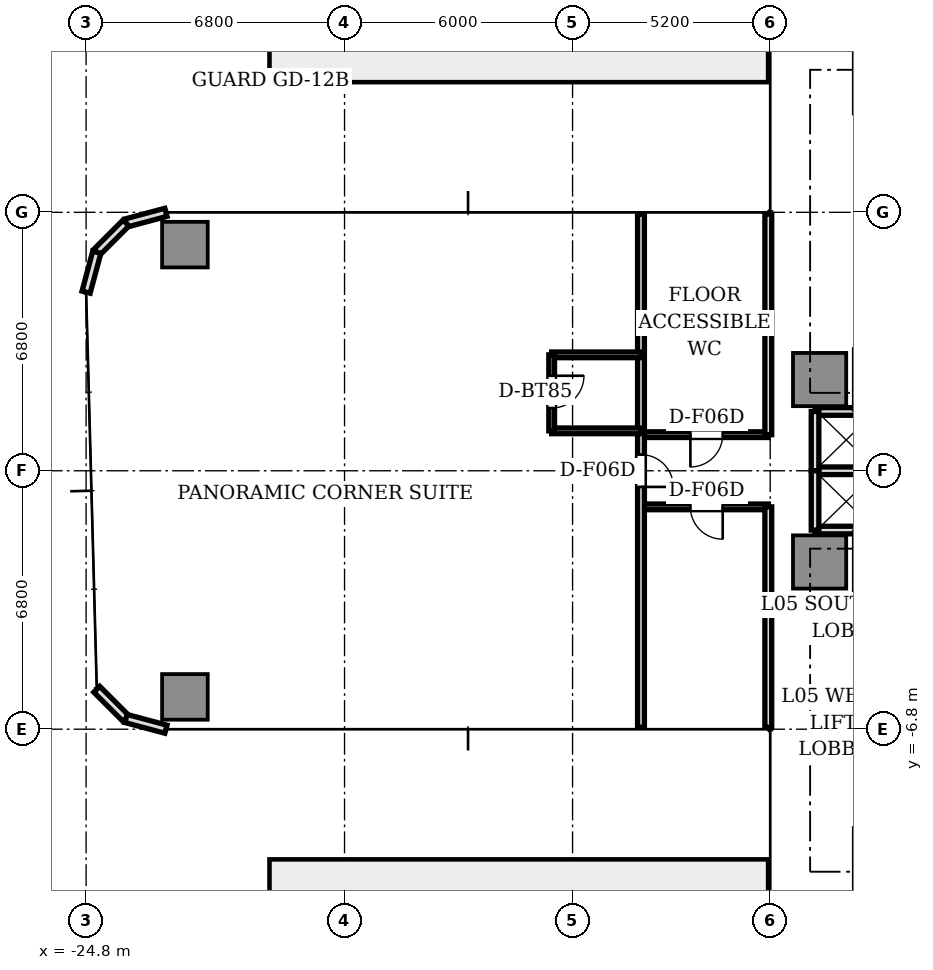
"""IFC4 building model, lengths in metres.
Left out: names, types, materials, properties, quantities, classifications, styles, units other than length and angle.
Written with IfcOpenShell. Run it as: python <this file> out.ifc"""

import sys

from ifc_helpers import new_model, si_unit, direction, frame, frame_2d, origin, origin_2d, place, context, subcontext, project, spatial, rectangle, extrude, source, transform, mapped, element, fill, save


model = new_model("IFC4")
c1 = context("Model", 3, precision=1e-05, world=origin(), true_north=direction((0.0, 1.0)))
c2 = subcontext(c1, "Body", "Model", "MODEL_VIEW")
j1 = project(units=[si_unit("LENGTHUNIT", "METRE"), si_unit("PLANEANGLEUNIT", "RADIAN")], contexts=[c1])
p1 = place(None, origin())
s1 = spatial("IfcSite", under=j1, at=p1, CompositionType="ELEMENT")
p2 = place(p1, origin())
s2 = spatial("IfcBuilding", under=s1, at=p2, CompositionType="ELEMENT")
p3 = place(p2, frame((0.0, 0.0, 23.1)))
s3 = spatial("IfcBuildingStorey", under=s2, at=p3, CompositionType="ELEMENT", Elevation=23.1)
m1 = source(origin(), c2, "Body", "SweptSolid", [
    extrude(rectangle(XDim=1.4, YDim=1.4, at=origin_2d()), origin(), (0.0, 0.0, 1.0), 3.11),
])
for number, where, z_axis, x_axis in (
    (1, (-5.5, 2.4, 0.0), (0.0, 0.0, 1.0), (1.0, 0.0, 0.0)),
    (2, (-5.5, -2.4, 0.0), (0.0, 0.0, 1.0), (1.0, 0.0, 0.0)),
):
    element("IfcColumn", number, at=place(p3, frame(where, z_axis=z_axis, x_axis=x_axis)), inside=s3, PredefinedType="COLUMN", context=c2, shape_type="MappedRepresentation", body=[
        mapped(m1, transform((0.0, 0.0, 0.0), scale=1.0)),
    ])
m2 = source(origin(), c2, "Body", "SweptSolid", [
    extrude(rectangle(XDim=1.2, YDim=1.2, at=origin_2d()), origin(), (0.0, 0.0, 1.0), 3.11),
])
for number, where, z_axis, x_axis in (
    (3, (-22.2, 5.95, 0.0), (0.0, 0.0, 1.0), (1.0, 0.0, 0.0)),
    (4, (-22.2, -5.95, 0.0), (0.0, 0.0, 1.0), (1.0, 0.0, 0.0)),
):
    element("IfcColumn", number, at=place(p3, frame(where, z_axis=z_axis, x_axis=x_axis)), inside=s3, PredefinedType="COLUMN", context=c2, shape_type="MappedRepresentation", body=[
        mapped(m2, transform((0.0, 0.0, 0.0), scale=1.0)),
    ])
for number, where, z_axis, x_axis in (
    (5, (-22.7, 6.8, 0.0), (0.0, 0.0, 1.0), (-0.966, -0.259, 0.0)),
    (6, (-23.75, 6.519, 0.0), (0.0, 0.0, 1.0), (-0.707, -0.707, 0.0)),
    (7, (-24.519, 5.75, 0.0), (0.0, 0.0, 1.0), (-0.259, -0.966, 0.0)),
    (8, (-24.519, -5.75, 0.0), (0.0, 0.0, 1.0), (0.707, -0.707, 0.0)),
    (9, (-23.75, -6.519, 0.0), (0.0, 0.0, 1.0), (0.966, -0.259, 0.0)),
):
    element("IfcWall", number, at=place(p3, frame(where, z_axis=z_axis, x_axis=x_axis)), inside=s3, PredefinedType="STANDARD", context=c2, shape_type="SweptSolid", body=[
        extrude(rectangle(XDim=1.087, YDim=0.22, at=frame_2d((0.543, 0.0))), origin(), (0.0, 0.0, 1.0), 3.11),
    ])
for number, where, z_axis, x_axis in (
    (10, (-5.62, 1.56, 0.0), (0.0, 0.0, 1.0), (1.0, 0.0, 0.0)),
    (11, (-5.62, -1.56, 0.0), (0.0, 0.0, 1.0), (1.0, 0.0, 0.0)),
    (12, (-5.62, 0.0, 0.0), (0.0, 0.0, 1.0), (1.0, 0.0, 0.0)),
):
    element("IfcWall", number, at=place(p3, frame(where, z_axis=z_axis, x_axis=x_axis)), inside=s3, PredefinedType="SOLIDWALL", context=c2, shape_type="SweptSolid", body=[
        extrude(rectangle(XDim=1.64, YDim=0.2, at=frame_2d((0.82, 0.0))), origin(), (0.0, 0.0, 1.0), 2.66),
    ])
for number, where, z_axis, x_axis in (
    (13, (-5.62, 0.0, 0.0), (0.0, 0.0, 1.0), (0.0, 1.0, 0.0)),
    (14, (-5.62, -1.56, 0.0), (0.0, 0.0, 1.0), (0.0, 1.0, 0.0)),
):
    element("IfcWall", number, at=place(p3, frame(where, z_axis=z_axis, x_axis=x_axis)), inside=s3, PredefinedType="SOLIDWALL", context=c2, shape_type="SweptSolid", body=[
        extrude(rectangle(XDim=1.56, YDim=0.2, at=frame_2d((0.78, 0.0))), origin(), (0.0, 0.0, 1.0), 2.66),
    ])
p4 = place(p3, frame((-6.85, -0.95, 0.0), z_axis=(0.0, 0.0, 1.0), x_axis=(-1.0, 0.0, 0.0)))
e15 = element("IfcWall", 15, at=p4, inside=s3, PredefinedType="PARTITIONING", context=c2, shape_type="SweptSolid", body=[
    extrude(rectangle(XDim=3.35, YDim=0.15, at=frame_2d((1.675, 0.0))), origin(), (0.0, 0.0, 1.0), 2.66),
])
p5 = place(p4, frame((1.2, 0.0, 0.0)))
e16 = element("IfcOpeningElement", 16, at=p5, cuts=e15, PredefinedType="OPENING", context=c2, shape_type="SweptSolid", body=[
    extrude(rectangle(XDim=0.85, YDim=2.1, at=frame_2d((0.425, 1.05))), frame((0.0, 0.085, 0.0), z_axis=(0.0, -1.0, 0.0), x_axis=(1.0, 0.0, 0.0)), (0.0, 0.0, 1.0), 0.17),
])
p6 = place(p3, frame((-6.85, 0.95, 0.0), z_axis=(0.0, 0.0, 1.0), x_axis=(-1.0, 0.0, 0.0)))
e17 = element("IfcWall", 17, at=p6, inside=s3, PredefinedType="PARTITIONING", context=c2, shape_type="SweptSolid", body=[
    extrude(rectangle(XDim=3.35, YDim=0.15, at=frame_2d((1.675, 0.0))), origin(), (0.0, 0.0, 1.0), 2.66),
])
p7 = place(p6, frame((1.2, 0.0, 0.0)))
e18 = element("IfcOpeningElement", 18, at=p7, cuts=e17, PredefinedType="OPENING", context=c2, shape_type="SweptSolid", body=[
    extrude(rectangle(XDim=0.85, YDim=2.1, at=frame_2d((0.425, 1.05))), frame((0.0, 0.085, 0.0), z_axis=(0.0, -1.0, 0.0), x_axis=(1.0, 0.0, 0.0)), (0.0, 0.0, 1.0), 0.17),
])
for number, where, z_axis, x_axis in (
    (19, (-6.85, -0.95, 0.0), (0.0, 0.0, 1.0), (0.0, -1.0, 0.0)),
    (20, (-6.85, 6.75, 0.0), (0.0, 0.0, 1.0), (0.0, -1.0, 0.0)),
):
    element("IfcWall", number, at=place(p3, frame(where, z_axis=z_axis, x_axis=x_axis)), inside=s3, PredefinedType="PARTITIONING", context=c2, shape_type="SweptSolid", body=[
        extrude(rectangle(XDim=5.8, YDim=0.18, at=frame_2d((2.9, 0.0))), origin(), (0.0, 0.0, 1.0), 2.66),
    ])
p8 = place(p3, frame((-10.2, 6.75, 0.0), z_axis=(0.0, 0.0, 1.0), x_axis=(0.0, -1.0, 0.0)))
e21 = element("IfcWall", 21, at=p8, inside=s3, PredefinedType="PARTITIONING", context=c2, shape_type="SweptSolid", body=[
    extrude(rectangle(XDim=13.5, YDim=0.18, at=frame_2d((6.75, 0.0))), origin(), (0.0, 0.0, 1.0), 2.66),
])
p9 = place(p8, frame((6.325, 0.0, 0.0)))
e22 = element("IfcOpeningElement", 22, at=p9, cuts=e21, PredefinedType="OPENING", context=c2, shape_type="SweptSolid", body=[
    extrude(rectangle(XDim=0.85, YDim=2.1, at=frame_2d((0.425, 1.05))), frame((0.0, 0.1, 0.0), z_axis=(0.0, -1.0, 0.0), x_axis=(1.0, 0.0, 0.0)), (0.0, 0.0, 1.0), 0.2),
])
p10 = place(p3, frame((-10.2, 1.05, 0.0), z_axis=(0.0, 0.0, 1.0), x_axis=(-1.0, 0.0, 0.0)))
e23 = element("IfcWall", 23, at=p10, inside=s3, PredefinedType="PARTITIONING", context=c2, shape_type="SweptSolid", body=[
    extrude(rectangle(XDim=2.35, YDim=0.15, at=frame_2d((1.175, 0.0))), origin(), (0.0, 0.0, 1.0), 2.66),
])
p11 = place(p3, frame((-10.2, 3.05, 0.0), z_axis=(0.0, 0.0, 1.0), x_axis=(-1.0, 0.0, 0.0)))
e24 = element("IfcWall", 24, at=p11, inside=s3, PredefinedType="PARTITIONING", context=c2, shape_type="SweptSolid", body=[
    extrude(rectangle(XDim=2.35, YDim=0.15, at=frame_2d((1.175, 0.0))), origin(), (0.0, 0.0, 1.0), 2.63),
])
p12 = place(p3, frame((-12.55, 3.05, 0.0), z_axis=(0.0, 0.0, 1.0), x_axis=(0.0, -1.0, 0.0)))
e25 = element("IfcWall", 25, at=p12, inside=s3, PredefinedType="PARTITIONING", context=c2, shape_type="SweptSolid", body=[
    extrude(rectangle(XDim=2.0, YDim=0.15, at=frame_2d((1.0, 0.0))), origin(), (0.0, 0.0, 1.0), 2.66),
])
p13 = place(p12, frame((0.55, 0.0, 0.0)))
e26 = element("IfcOpeningElement", 26, at=p13, cuts=e25, PredefinedType="OPENING", context=c2, shape_type="SweptSolid", body=[
    extrude(rectangle(XDim=0.85, YDim=2.1, at=frame_2d((0.425, 1.05))), frame((0.0, 0.085, 0.0), z_axis=(0.0, -1.0, 0.0), x_axis=(1.0, 0.0, 0.0)), (0.0, 0.0, 1.0), 0.17),
])
m3 = source(origin(), c2, "Body", "SweptSolid", [
    extrude(rectangle(XDim=0.85, YDim=0.05, at=origin_2d()), origin(), (0.0, 0.0, 1.0), 2.1),
])
p14 = place(p5, frame((0.425, 0.0, 0.0)))
e27 = element("IfcDoor", 27, at=p14, inside=s3, OperationType="SINGLE_SWING_LEFT", PredefinedType="DOOR", context=c2, shape_type="MappedRepresentation", body=[
    mapped(m3, transform((0.0, 0.0, 0.0), scale=1.0)),
])
fill(e16, e27)
p15 = place(p7, frame((0.425, 0.0, 0.0)))
e28 = element("IfcDoor", 28, at=p15, inside=s3, OperationType="SINGLE_SWING_RIGHT", PredefinedType="DOOR", context=c2, shape_type="MappedRepresentation", body=[
    mapped(m3, transform((0.0, 0.0, 0.0), scale=1.0)),
])
fill(e18, e28)
p16 = place(p13, frame((0.425, 0.0, 0.0)))
e29 = element("IfcDoor", 29, at=p16, inside=s3, OperationType="SINGLE_SWING_LEFT", PredefinedType="DOOR", context=c2, shape_type="MappedRepresentation", body=[
    mapped(m3, transform((0.0, 0.0, 0.0), scale=1.0)),
])
fill(e26, e29)
p17 = place(p9, frame((0.425, 0.0, 0.0)))
e30 = element("IfcDoor", 30, at=p17, inside=s3, OperationType="SINGLE_SWING_RIGHT", PredefinedType="DOOR", context=c2, shape_type="MappedRepresentation", body=[
    mapped(m3, transform((0.0, 0.0, 0.0), scale=1.0)),
])
fill(e22, e30)
save(model, sys.argv[1])
